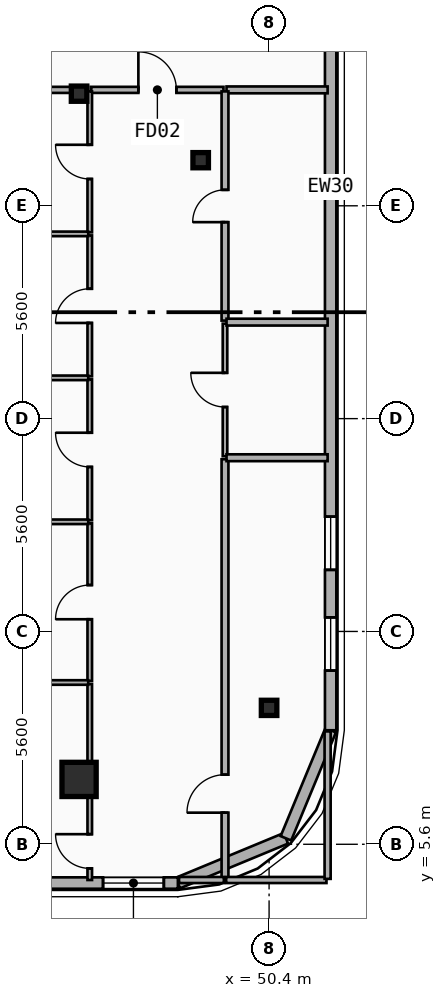
"""IFC4 building model, lengths in metres.
Left out: names, types, materials, properties, quantities, classifications, styles, units other than length and angle.
Written with IfcOpenShell. Run it as: python <this file> out.ifc"""

import sys

from ifc_helpers import new_model, si_unit, direction, frame, frame_2d, origin, origin_2d, place, context, subcontext, project, spatial, rectangle, i_section, extrude, element, fill, save


model = new_model("IFC4")
c1 = context("Model", 3, precision=1e-05, world=origin(), true_north=direction((0.0, 1.0)))
c2 = subcontext(c1, "Body", "Model", "MODEL_VIEW")
j1 = project(units=[si_unit("LENGTHUNIT", "METRE"), si_unit("PLANEANGLEUNIT", "RADIAN")], contexts=[c1])
p1 = place(None, origin())
s1 = spatial("IfcSite", under=j1, at=p1, CompositionType="ELEMENT")
p2 = place(p1, origin())
s2 = spatial("IfcBuilding", under=s1, at=p2, CompositionType="ELEMENT")
p3 = place(p2, frame((0.0, 0.0, 207.6)))
s3 = spatial("IfcBuildingStorey", under=s2, at=p3, CompositionType="ELEMENT", Elevation=207.6)
p4 = place(p3, frame((45.4, 25.35, 0.0), z_axis=(0.0, 0.0, 1.0), x_axis=(1.0, 0.0, 0.0)))
e1 = element("IfcColumn", 1, at=p4, inside=s3, PredefinedType="COLUMN", context=c2, shape_type="SweptSolid", body=[
    extrude(i_section(OverallWidth=0.408, OverallDepth=0.4, WebThickness=0.025, FlangeThickness=0.039, FilletRadius=0.015, at=origin_2d()), origin(), (0.0, 0.0, 1.0), 3.6),
])
p5 = place(p3, frame((45.4, 7.415, 0.0), z_axis=(0.0, -0.090237335163, 0.995920289653), x_axis=(1.0, 0.0, 0.0)))
e2 = element("IfcColumn", 2, at=p5, inside=s3, PredefinedType="COLUMN", context=c2, shape_type="SweptSolid", body=[
    extrude(rectangle(XDim=0.9, YDim=0.9, at=origin_2d()), origin(), (0.0, 0.0, 1.0), 3.615),
])
p6 = place(p3, frame((48.6, 23.6, 0.0), z_axis=(0.0, 0.0, 1.0), x_axis=(1.0, 0.0, 0.0)))
e3 = element("IfcColumn", 3, at=p6, inside=s3, PredefinedType="COLUMN", context=c2, shape_type="SweptSolid", body=[
    extrude(i_section(OverallWidth=0.408, OverallDepth=0.4, WebThickness=0.025, FlangeThickness=0.039, FilletRadius=0.015, at=origin_2d()), origin(), (0.0, 0.0, 1.0), 3.6),
])
p7 = place(p3, frame((50.4, 9.285, 0.0), z_axis=(0.0, -0.079906436036, 0.996802368316), x_axis=(1.0, 0.0, 0.0)))
e4 = element("IfcColumn", 4, at=p7, inside=s3, PredefinedType="COLUMN", context=c2, shape_type="SweptSolid", body=[
    extrude(i_section(OverallWidth=0.408, OverallDepth=0.4, WebThickness=0.025, FlangeThickness=0.039, FilletRadius=0.015, at=origin_2d()), origin(), (0.0, 0.0, 1.0), 3.611),
])
p8 = place(p3, frame((50.843, 5.757, 0.0), z_axis=(0.0, 0.0, 1.0), x_axis=(-0.92389884758, -0.382636798336, 0.0)))
e5 = element("IfcWall", 5, at=p8, inside=s3, PredefinedType="SOLIDWALL", context=c2, shape_type="SweptSolid", body=[
    extrude(rectangle(XDim=3.077, YDim=0.3, at=frame_2d((1.538, 0.0))), origin(), (0.0, 0.0, 1.0), 3.34),
])
p9 = place(p3, frame((52.02, 8.6, 0.0), z_axis=(0.0, 0.0, 1.0), x_axis=(-0.382676475685, -0.923882414032, 0.0)))
e6 = element("IfcWall", 6, at=p9, inside=s3, PredefinedType="SOLIDWALL", context=c2, shape_type="SweptSolid", body=[
    extrude(rectangle(XDim=3.077, YDim=0.3, at=frame_2d((1.539, 0.0))), origin(), (0.0, 0.0, 1.0), 3.34),
])
p10 = place(p3, frame((52.02, 37.2, 0.0), z_axis=(0.0, 0.0, 1.0), x_axis=(0.0, -1.0, 0.0)))
e7 = element("IfcWall", 7, at=p10, inside=s3, PredefinedType="SOLIDWALL", context=c2, shape_type="SweptSolid", body=[
    extrude(rectangle(XDim=28.6, YDim=0.3, at=frame_2d((14.3, 0.0))), origin(), (0.0, 0.0, 1.0), 3.34),
])
p11 = place(p10, frame((2.38, 0.0, 0.34)))
e8 = element("IfcOpeningElement", 8, at=p11, cuts=e7, PredefinedType="OPENING", context=c2, shape_type="SweptSolid", body=[
    extrude(rectangle(XDim=1.4, YDim=2.1, at=frame_2d((0.7, 1.05))), frame((0.0, 0.16, 0.0), z_axis=(0.0, -1.0, 0.0), x_axis=(1.0, 0.0, 0.0)), (0.0, 0.0, 1.0), 0.32),
])
p12 = place(p10, frame((5.84, 0.0, 0.34)))
e9 = element("IfcOpeningElement", 9, at=p12, cuts=e7, PredefinedType="OPENING", context=c2, shape_type="SweptSolid", body=[
    extrude(rectangle(XDim=1.4, YDim=2.1, at=frame_2d((0.7, 1.05))), frame((0.0, 0.16, 0.0), z_axis=(0.0, -1.0, 0.0), x_axis=(1.0, 0.0, 0.0)), (0.0, 0.0, 1.0), 0.32),
])
p13 = place(p10, frame((22.979, 0.0, 0.34)))
e10 = element("IfcOpeningElement", 10, at=p13, cuts=e7, PredefinedType="OPENING", context=c2, shape_type="SweptSolid", body=[
    extrude(rectangle(XDim=1.4, YDim=2.1, at=frame_2d((0.7, 1.05))), frame((0.0, 0.16, 0.0), z_axis=(0.0, -1.0, 0.0), x_axis=(1.0, 0.0, 0.0)), (0.0, 0.0, 1.0), 0.32),
])
p14 = place(p10, frame((25.63, 0.0, 0.34)))
e11 = element("IfcOpeningElement", 11, at=p14, cuts=e7, PredefinedType="OPENING", context=c2, shape_type="SweptSolid", body=[
    extrude(rectangle(XDim=1.4, YDim=2.1, at=frame_2d((0.7, 1.05))), frame((0.0, 0.16, 0.0), z_axis=(0.0, -1.0, 0.0), x_axis=(1.0, 0.0, 0.0)), (0.0, 0.0, 1.0), 0.32),
])
p15 = place(p3, frame((48.0, 4.58, 0.0), z_axis=(0.0, 0.0, 1.0), x_axis=(-1.0, 0.0, 0.0)))
e12 = element("IfcWall", 12, at=p15, inside=s3, PredefinedType="SOLIDWALL", context=c2, shape_type="SweptSolid", body=[
    extrude(rectangle(XDim=38.4, YDim=0.3, at=frame_2d((19.2, 0.0))), origin(), (0.0, 0.0, 1.0), 3.34),
])
p16 = place(p15, frame((36.19, 0.0, 0.48)))
e13 = element("IfcOpeningElement", 13, at=p16, cuts=e12, PredefinedType="OPENING", context=c2, shape_type="SweptSolid", body=[
    extrude(rectangle(XDim=1.8, YDim=1.8, at=frame_2d((0.9, 0.9))), frame((0.0, 0.16, 0.0), z_axis=(0.0, -1.0, 0.0), x_axis=(1.0, 0.0, 0.0)), (0.0, 0.0, 1.0), 0.32),
])
p17 = place(p15, frame((31.475, 0.0, 0.65)))
e14 = element("IfcOpeningElement", 14, at=p17, cuts=e12, PredefinedType="OPENING", context=c2, shape_type="SweptSolid", body=[
    extrude(rectangle(XDim=2.0, YDim=2.2, at=frame_2d((1.0, 1.1))), frame((0.0, 0.16, 0.0), z_axis=(0.0, -1.0, 0.0), x_axis=(1.0, 0.0, 0.0)), (0.0, 0.0, 1.0), 0.32),
])
p18 = place(p15, frame((13.014, 0.0, 0.65)))
e15 = element("IfcOpeningElement", 15, at=p18, cuts=e12, PredefinedType="OPENING", context=c2, shape_type="SweptSolid", body=[
    extrude(rectangle(XDim=2.0, YDim=2.2, at=frame_2d((1.0, 1.1))), frame((0.0, 0.16, 0.0), z_axis=(0.0, -1.0, 0.0), x_axis=(1.0, 0.0, 0.0)), (0.0, 0.0, 1.0), 0.32),
])
p19 = place(p15, frame((0.369, 0.0, 0.75)))
e16 = element("IfcOpeningElement", 16, at=p19, cuts=e12, PredefinedType="OPENING", context=c2, shape_type="SweptSolid", body=[
    extrude(rectangle(XDim=1.6, YDim=1.95, at=frame_2d((0.8, 0.975))), frame((0.0, 0.16, 0.0), z_axis=(0.0, -1.0, 0.0), x_axis=(1.0, 0.0, 0.0)), (0.0, 0.0, 1.0), 0.32),
])
p20 = place(p15, frame((7.35, 0.0, 0.65)))
e17 = element("IfcOpeningElement", 17, at=p20, cuts=e12, PredefinedType="OPENING", context=c2, shape_type="SweptSolid", body=[
    extrude(rectangle(XDim=2.0, YDim=2.2, at=frame_2d((1.0, 1.1))), frame((0.0, 0.16, 0.0), z_axis=(0.0, -1.0, 0.0), x_axis=(1.0, 0.0, 0.0)), (0.0, 0.0, 1.0), 0.32),
])
p21 = place(p3, frame((45.721, 25.45, 0.0), z_axis=(0.0, 0.0, 1.0), x_axis=(1.0, 0.0, 0.0)))
e18 = element("IfcWall", 18, at=p21, inside=s3, PredefinedType="PARTITIONING", context=c2, shape_type="SweptSolid", body=[
    extrude(rectangle(XDim=3.479, YDim=0.16, at=frame_2d((1.74, 0.0))), origin(), (0.0, 0.0, 1.0), 2.52),
])
p22 = place(p21, frame((1.24, 0.0, 0.0)))
e19 = element("IfcOpeningElement", 19, at=p22, cuts=e18, PredefinedType="OPENING", context=c2, shape_type="SweptSolid", body=[
    extrude(rectangle(XDim=1.0, YDim=2.15, at=frame_2d((0.5, 1.075))), frame((0.0, 0.09, 0.0), z_axis=(0.0, -1.0, 0.0), x_axis=(1.0, 0.0, 0.0)), (0.0, 0.0, 1.0), 0.18),
])
p23 = place(p3, frame((49.28, 25.45, 0.0), z_axis=(0.0, 0.0, 1.0), x_axis=(1.0, 0.0, 0.0)))
e20 = element("IfcWall", 20, at=p23, inside=s3, PredefinedType="PLUMBINGWALL", context=c2, shape_type="SweptSolid", body=[
    extrude(rectangle(XDim=2.66, YDim=0.18, at=frame_2d((1.33, 0.0))), origin(), (0.0, 0.0, 1.0), 2.67),
])
p24 = place(p3, frame((38.39, 25.45, 0.0), z_axis=(0.0, 0.0, 1.0), x_axis=(1.0, 0.0, 0.0)))
e21 = element("IfcWall", 21, at=p24, inside=s3, PredefinedType="PARTITIONING", context=c2, shape_type="SweptSolid", body=[
    extrude(rectangle(XDim=7.251, YDim=0.16, at=frame_2d((3.625, 0.0))), origin(), (0.0, 0.0, 1.0), 2.52),
])
p25 = place(p3, frame((49.24, 4.66, 0.0), z_axis=(0.0, 0.0, 1.0), x_axis=(0.0, 1.0, 0.0)))
e22 = element("IfcWall", 22, at=p25, inside=s3, PredefinedType="PLUMBINGWALL", context=c2, shape_type="SweptSolid", body=[
    extrude(rectangle(XDim=11.071, YDim=0.18, at=frame_2d((5.536, 0.0))), origin(), (0.0, 0.0, 1.0), 2.82),
])
p26 = place(p25, frame((1.772, 0.0, 0.0)))
e23 = element("IfcOpeningElement", 23, at=p26, cuts=e22, PredefinedType="OPENING", context=c2, shape_type="SweptSolid", body=[
    extrude(rectangle(XDim=1.0, YDim=2.15, at=frame_2d((0.5, 1.075))), frame((0.0, 0.1, 0.0), z_axis=(0.0, -1.0, 0.0), x_axis=(1.0, 0.0, 0.0)), (0.0, 0.0, 1.0), 0.2),
])
p27 = place(p3, frame((49.24, 15.811, 0.0), z_axis=(0.0, 0.0, 1.0), x_axis=(0.0, 1.0, 0.0)))
e24 = element("IfcWall", 24, at=p27, inside=s3, PredefinedType="PARTITIONING", context=c2, shape_type="SweptSolid", body=[
    extrude(rectangle(XDim=3.488, YDim=0.12, at=frame_2d((1.744, 0.0))), origin(), (0.0, 0.0, 1.0), 2.82),
])
p28 = place(p27, frame((1.294, 0.0, 0.0)))
e25 = element("IfcOpeningElement", 25, at=p28, cuts=e24, PredefinedType="OPENING", context=c2, shape_type="SweptSolid", body=[
    extrude(rectangle(XDim=0.9, YDim=2.1, at=frame_2d((0.45, 1.05))), frame((0.0, 0.07, 0.0), z_axis=(0.0, -1.0, 0.0), x_axis=(1.0, 0.0, 0.0)), (0.0, 0.0, 1.0), 0.14),
])
p29 = place(p3, frame((49.24, 19.379, 0.0), z_axis=(0.0, 0.0, 1.0), x_axis=(0.0, 1.0, 0.0)))
e26 = element("IfcWall", 26, at=p29, inside=s3, PredefinedType="PLUMBINGWALL", context=c2, shape_type="SweptSolid", body=[
    extrude(rectangle(XDim=6.031, YDim=0.18, at=frame_2d((3.016, 0.0))), origin(), (0.0, 0.0, 1.0), 2.82),
])
p30 = place(p29, frame((2.591, 0.0, 0.0)))
e27 = element("IfcOpeningElement", 27, at=p30, cuts=e26, PredefinedType="OPENING", context=c2, shape_type="SweptSolid", body=[
    extrude(rectangle(XDim=0.85, YDim=2.1, at=frame_2d((0.425, 1.05))), frame((0.0, 0.1, 0.0), z_axis=(0.0, -1.0, 0.0), x_axis=(1.0, 0.0, 0.0)), (0.0, 0.0, 1.0), 0.2),
])
p31 = place(p3, frame((45.681, 4.66, 0.0), z_axis=(0.0, 0.0, 1.0), x_axis=(0.0, 1.0, 0.0)))
e28 = element("IfcWall", 28, at=p31, inside=s3, PredefinedType="PARTITIONING", context=c2, shape_type="SweptSolid", body=[
    extrude(rectangle(XDim=5.157, YDim=0.12, at=frame_2d((2.579, 0.0))), origin(), (0.0, 0.0, 1.0), 2.52),
])
p32 = place(p31, frame((0.306, 0.0, 0.0)))
e29 = element("IfcOpeningElement", 29, at=p32, cuts=e28, PredefinedType="OPENING", context=c2, shape_type="SweptSolid", body=[
    extrude(rectangle(XDim=0.9, YDim=2.1, at=frame_2d((0.45, 1.05))), frame((0.0, 0.07, 0.0), z_axis=(0.0, -1.0, 0.0), x_axis=(1.0, 0.0, 0.0)), (0.0, 0.0, 1.0), 0.14),
])
p33 = place(p3, frame((45.681, 9.897, 0.0), z_axis=(0.0, 0.0, 1.0), x_axis=(0.0, 1.0, 0.0)))
e30 = element("IfcWall", 30, at=p33, inside=s3, PredefinedType="PARTITIONING", context=c2, shape_type="SweptSolid", body=[
    extrude(rectangle(XDim=4.148, YDim=0.12, at=frame_2d((2.074, 0.0))), origin(), (0.0, 0.0, 1.0), 2.52),
])
p34 = place(p33, frame((1.624, 0.0, 0.0)))
e31 = element("IfcOpeningElement", 31, at=p34, cuts=e30, PredefinedType="OPENING", context=c2, shape_type="SweptSolid", body=[
    extrude(rectangle(XDim=0.9, YDim=2.1, at=frame_2d((0.45, 1.05))), frame((0.0, 0.07, 0.0), z_axis=(0.0, -1.0, 0.0), x_axis=(1.0, 0.0, 0.0)), (0.0, 0.0, 1.0), 0.14),
])
p35 = place(p3, frame((45.681, 14.125, 0.0), z_axis=(0.0, 0.0, 1.0), x_axis=(0.0, 1.0, 0.0)))
e32 = element("IfcWall", 32, at=p35, inside=s3, PredefinedType="PARTITIONING", context=c2, shape_type="SweptSolid", body=[
    extrude(rectangle(XDim=3.708, YDim=0.12, at=frame_2d((1.854, 0.0))), origin(), (0.0, 0.0, 1.0), 2.52),
])
p36 = place(p35, frame((1.404, 0.0, 0.0)))
e33 = element("IfcOpeningElement", 33, at=p36, cuts=e32, PredefinedType="OPENING", context=c2, shape_type="SweptSolid", body=[
    extrude(rectangle(XDim=0.9, YDim=2.1, at=frame_2d((0.45, 1.05))), frame((0.0, 0.07, 0.0), z_axis=(0.0, -1.0, 0.0), x_axis=(1.0, 0.0, 0.0)), (0.0, 0.0, 1.0), 0.14),
])
p37 = place(p3, frame((45.681, 17.913, 0.0), z_axis=(0.0, 0.0, 1.0), x_axis=(0.0, 1.0, 0.0)))
e34 = element("IfcWall", 34, at=p37, inside=s3, PredefinedType="PARTITIONING", context=c2, shape_type="SweptSolid", body=[
    extrude(rectangle(XDim=3.708, YDim=0.12, at=frame_2d((1.854, 0.0))), origin(), (0.0, 0.0, 1.0), 2.52),
])
p38 = place(p37, frame((1.404, 0.0, 0.0)))
e35 = element("IfcOpeningElement", 35, at=p38, cuts=e34, PredefinedType="OPENING", context=c2, shape_type="SweptSolid", body=[
    extrude(rectangle(XDim=0.9, YDim=2.1, at=frame_2d((0.45, 1.05))), frame((0.0, 0.07, 0.0), z_axis=(0.0, -1.0, 0.0), x_axis=(1.0, 0.0, 0.0)), (0.0, 0.0, 1.0), 0.14),
])
p39 = place(p3, frame((45.681, 21.701, 0.0), z_axis=(0.0, 0.0, 1.0), x_axis=(0.0, 1.0, 0.0)))
e36 = element("IfcWall", 36, at=p39, inside=s3, PredefinedType="PARTITIONING", context=c2, shape_type="SweptSolid", body=[
    extrude(rectangle(XDim=3.709, YDim=0.12, at=frame_2d((1.854, 0.0))), origin(), (0.0, 0.0, 1.0), 2.52),
])
p40 = place(p39, frame((1.405, 0.0, 0.0)))
e37 = element("IfcOpeningElement", 37, at=p40, cuts=e36, PredefinedType="OPENING", context=c2, shape_type="SweptSolid", body=[
    extrude(rectangle(XDim=0.9, YDim=2.1, at=frame_2d((0.45, 1.05))), frame((0.0, 0.07, 0.0), z_axis=(0.0, -1.0, 0.0), x_axis=(1.0, 0.0, 0.0)), (0.0, 0.0, 1.0), 0.14),
])
for number, where, z_axis, x_axis in (
    (38, (49.28, 15.771, 0.0), (0.0, 0.0, 1.0), (1.0, 0.0, 0.0)),
    (39, (49.28, 19.339, 0.0), (0.0, 0.0, 1.0), (1.0, 0.0, 0.0)),
):
    element("IfcWall", number, at=place(p3, frame(where, z_axis=z_axis, x_axis=x_axis)), inside=s3, PredefinedType="PLUMBINGWALL", context=c2, shape_type="SweptSolid", body=[
        extrude(rectangle(XDim=2.66, YDim=0.18, at=frame_2d((1.33, 0.0))), origin(), (0.0, 0.0, 1.0), 2.67),
    ])
for number, where, z_axis, x_axis in (
    (40, (38.39, 9.857, 0.0), (0.0, 0.0, 1.0), (1.0, 0.0, 0.0)),
    (41, (38.39, 14.085, 0.0), (0.0, 0.0, 1.0), (1.0, 0.0, 0.0)),
    (42, (38.39, 17.873, 0.0), (0.0, 0.0, 1.0), (1.0, 0.0, 0.0)),
    (43, (38.39, 21.661, 0.0), (0.0, 0.0, 1.0), (1.0, 0.0, 0.0)),
):
    element("IfcWall", number, at=place(p3, frame(where, z_axis=z_axis, x_axis=x_axis)), inside=s3, PredefinedType="PARTITIONING", context=c2, shape_type="SweptSolid", body=[
        extrude(rectangle(XDim=7.251, YDim=0.12, at=frame_2d((3.625, 0.0))), origin(), (0.0, 0.0, 1.0), 2.52),
    ])
p41 = place(p3, frame((48.03, 4.66, 0.0), z_axis=(0.0, 0.0, 1.0), x_axis=(1.0, 0.0, 0.0)))
e44 = element("IfcWall", 44, at=p41, inside=s3, PredefinedType="PARTITIONING", context=c2, shape_type="SweptSolid", body=[
    extrude(rectangle(XDim=1.18, YDim=0.16, at=frame_2d((0.59, 0.0))), origin(), (0.0, 0.0, 1.0), 3.34),
])
p42 = place(p3, frame((49.27, 4.66, 0.0), z_axis=(0.0, 0.0, 1.0), x_axis=(1.0, 0.0, 0.0)))
e45 = element("IfcWall", 45, at=p42, inside=s3, PredefinedType="PARTITIONING", context=c2, shape_type="SweptSolid", body=[
    extrude(rectangle(XDim=2.64, YDim=0.16, at=frame_2d((1.32, 0.0))), origin(), (0.0, 0.0, 1.0), 3.34),
])
p43 = place(p3, frame((51.94, 4.69, 0.0), z_axis=(0.0, 0.0, 1.0), x_axis=(0.0, 1.0, 0.0)))
e46 = element("IfcWall", 46, at=p43, inside=s3, PredefinedType="PARTITIONING", context=c2, shape_type="SweptSolid", body=[
    extrude(rectangle(XDim=3.88, YDim=0.16, at=frame_2d((1.94, 0.0))), origin(), (0.0, 0.0, 1.0), 3.34),
])
p44 = place(p13, origin())
e47 = element("IfcWindow", 47, at=p44, inside=s3, PartitioningType="SINGLE_PANEL", PredefinedType="WINDOW", context=c2, shape_type="SweptSolid", body=[
    extrude(rectangle(XDim=1.4, YDim=2.1, at=frame_2d((0.7, 1.05))), frame((0.0, 0.03, 0.0), z_axis=(0.0, -1.0, 0.0), x_axis=(1.0, 0.0, 0.0)), (0.0, 0.0, 1.0), 0.06),
])
fill(e10, e47)
p45 = place(p14, origin())
e48 = element("IfcWindow", 48, at=p45, inside=s3, PartitioningType="SINGLE_PANEL", PredefinedType="WINDOW", context=c2, shape_type="SweptSolid", body=[
    extrude(rectangle(XDim=1.4, YDim=2.1, at=frame_2d((0.7, 1.05))), frame((0.0, 0.03, 0.0), z_axis=(0.0, -1.0, 0.0), x_axis=(1.0, 0.0, 0.0)), (0.0, 0.0, 1.0), 0.06),
])
fill(e11, e48)
p46 = place(p19, origin())
e49 = element("IfcWindow", 49, at=p46, inside=s3, PartitioningType="SINGLE_PANEL", PredefinedType="WINDOW", context=c2, shape_type="SweptSolid", body=[
    extrude(rectangle(XDim=1.6, YDim=1.95, at=frame_2d((0.8, 0.975))), frame((0.0, 0.03, 0.0), z_axis=(0.0, -1.0, 0.0), x_axis=(1.0, 0.0, 0.0)), (0.0, 0.0, 1.0), 0.06),
])
fill(e16, e49)
p47 = place(p22, origin())
e50 = element("IfcDoor", 50, at=p47, inside=s3, OperationType="SINGLE_SWING_LEFT", PredefinedType="DOOR", context=c2, shape_type="SweptSolid", body=[
    extrude(rectangle(XDim=1.0, YDim=2.15, at=frame_2d((0.5, 1.075))), frame((0.0, 0.025, 0.0), z_axis=(0.0, -1.0, 0.0), x_axis=(1.0, 0.0, 0.0)), (0.0, 0.0, 1.0), 0.05),
])
fill(e19, e50)
p48 = place(p26, origin())
e51 = element("IfcDoor", 51, at=p48, inside=s3, OperationType="SINGLE_SWING_LEFT", PredefinedType="DOOR", context=c2, shape_type="SweptSolid", body=[
    extrude(rectangle(XDim=1.0, YDim=2.15, at=frame_2d((0.5, 1.075))), frame((0.0, 0.025, 0.0), z_axis=(0.0, -1.0, 0.0), x_axis=(1.0, 0.0, 0.0)), (0.0, 0.0, 1.0), 0.05),
])
fill(e23, e51)
p49 = place(p28, origin())
e52 = element("IfcDoor", 52, at=p49, inside=s3, OperationType="SINGLE_SWING_RIGHT", PredefinedType="DOOR", context=c2, shape_type="SweptSolid", body=[
    extrude(rectangle(XDim=0.9, YDim=2.1, at=frame_2d((0.45, 1.05))), frame((0.0, 0.025, 0.0), z_axis=(0.0, -1.0, 0.0), x_axis=(1.0, 0.0, 0.0)), (0.0, 0.0, 1.0), 0.05),
])
fill(e25, e52)
p50 = place(p30, origin())
e53 = element("IfcDoor", 53, at=p50, inside=s3, OperationType="SINGLE_SWING_LEFT", PredefinedType="DOOR", context=c2, shape_type="SweptSolid", body=[
    extrude(rectangle(XDim=0.85, YDim=2.1, at=frame_2d((0.425, 1.05))), frame((0.0, 0.025, 0.0), z_axis=(0.0, -1.0, 0.0), x_axis=(1.0, 0.0, 0.0)), (0.0, 0.0, 1.0), 0.05),
])
fill(e27, e53)
p51 = place(p32, origin())
e54 = element("IfcDoor", 54, at=p51, inside=s3, OperationType="SINGLE_SWING_RIGHT", PredefinedType="DOOR", context=c2, shape_type="SweptSolid", body=[
    extrude(rectangle(XDim=0.9, YDim=2.1, at=frame_2d((0.45, 1.05))), frame((0.0, 0.025, 0.0), z_axis=(0.0, -1.0, 0.0), x_axis=(1.0, 0.0, 0.0)), (0.0, 0.0, 1.0), 0.05),
])
fill(e29, e54)
p52 = place(p34, origin())
e55 = element("IfcDoor", 55, at=p52, inside=s3, OperationType="SINGLE_SWING_LEFT", PredefinedType="DOOR", context=c2, shape_type="SweptSolid", body=[
    extrude(rectangle(XDim=0.9, YDim=2.1, at=frame_2d((0.45, 1.05))), frame((0.0, 0.025, 0.0), z_axis=(0.0, -1.0, 0.0), x_axis=(1.0, 0.0, 0.0)), (0.0, 0.0, 1.0), 0.05),
])
fill(e31, e55)
p53 = place(p36, origin())
e56 = element("IfcDoor", 56, at=p53, inside=s3, OperationType="SINGLE_SWING_RIGHT", PredefinedType="DOOR", context=c2, shape_type="SweptSolid", body=[
    extrude(rectangle(XDim=0.9, YDim=2.1, at=frame_2d((0.45, 1.05))), frame((0.0, 0.025, 0.0), z_axis=(0.0, -1.0, 0.0), x_axis=(1.0, 0.0, 0.0)), (0.0, 0.0, 1.0), 0.05),
])
fill(e33, e56)
p54 = place(p38, origin())
e57 = element("IfcDoor", 57, at=p54, inside=s3, OperationType="SINGLE_SWING_LEFT", PredefinedType="DOOR", context=c2, shape_type="SweptSolid", body=[
    extrude(rectangle(XDim=0.9, YDim=2.1, at=frame_2d((0.45, 1.05))), frame((0.0, 0.025, 0.0), z_axis=(0.0, -1.0, 0.0), x_axis=(1.0, 0.0, 0.0)), (0.0, 0.0, 1.0), 0.05),
])
fill(e35, e57)
p55 = place(p40, origin())
e58 = element("IfcDoor", 58, at=p55, inside=s3, OperationType="SINGLE_SWING_RIGHT", PredefinedType="DOOR", context=c2, shape_type="SweptSolid", body=[
    extrude(rectangle(XDim=0.9, YDim=2.1, at=frame_2d((0.45, 1.05))), frame((0.0, 0.025, 0.0), z_axis=(0.0, -1.0, 0.0), x_axis=(1.0, 0.0, 0.0)), (0.0, 0.0, 1.0), 0.05),
])
fill(e37, e58)
save(model, sys.argv[1])
